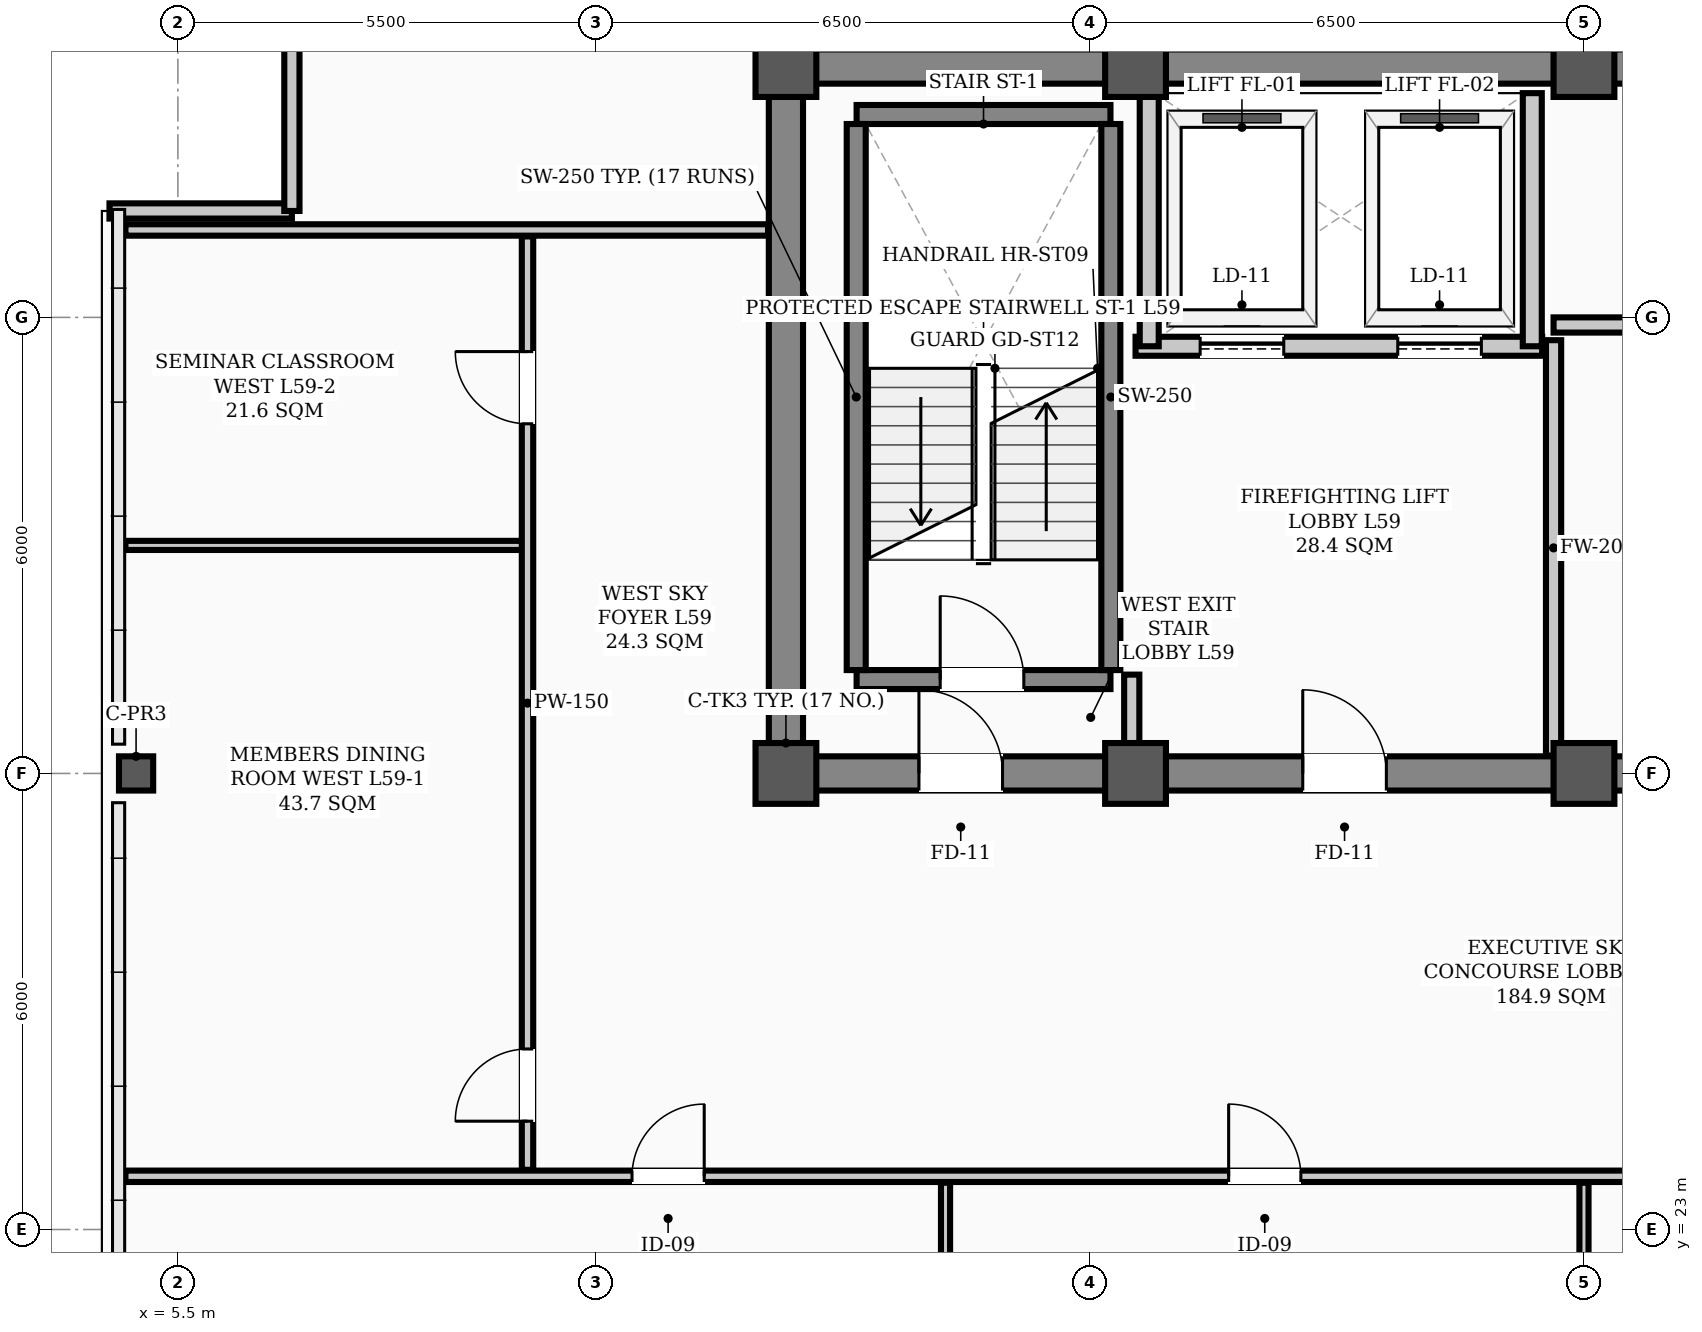
"""IFC4 building model, lengths in metres.
Left out: names, types, materials, properties, quantities, classifications, styles, units other than length and angle.
Written with IfcOpenShell. Run it as: python <this file> out.ifc"""

import sys

from ifc_helpers import new_model, si_unit, direction, frame, frame_2d, origin, origin_2d, place, context, subcontext, project, spatial, rectangle, hollow_rectangle, extrude, element, fill, save


model = new_model("IFC4")
c1 = context("Model", 3, precision=1e-05, world=origin(), true_north=direction((0.0, 1.0)))
c2 = subcontext(c1, "Body", "Model", "MODEL_VIEW")
j1 = project(units=[si_unit("LENGTHUNIT", "METRE"), si_unit("PLANEANGLEUNIT", "RADIAN")], contexts=[c1])
p1 = place(None, origin())
s1 = spatial("IfcSite", under=j1, at=p1, CompositionType="ELEMENT")
p2 = place(p1, origin())
s2 = spatial("IfcBuilding", under=s1, at=p2, CompositionType="ELEMENT")
p3 = place(p2, frame((0.0, 0.0, 238.4)))
s3 = spatial("IfcBuildingStorey", under=s2, at=p3, CompositionType="ELEMENT", Elevation=238.4)
for number, where, z_axis, x_axis in (
    (1, (13.5, 29.0, 0.0), (0.0, 0.0, 1.0), (1.0, 0.0, 0.0)),
    (2, (13.5, 38.3, 0.0), (0.0, 0.0, 1.0), (1.0, 0.0, 0.0)),
    (3, (18.1, 29.0, 0.0), (0.0, 0.0, 1.0), (1.0, 0.0, 0.0)),
    (4, (18.1, 38.3, 0.0), (0.0, 0.0, 1.0), (1.0, 0.0, 0.0)),
    (5, (24.0, 29.0, 0.0), (0.0, 0.0, 1.0), (1.0, 0.0, 0.0)),
    (6, (24.0, 38.3, 0.0), (0.0, 0.0, 1.0), (1.0, 0.0, 0.0)),
):
    element("IfcColumn", number, at=place(p3, frame(where, z_axis=z_axis, x_axis=x_axis)), inside=s3, PredefinedType="COLUMN", context=c2, shape_type="SweptSolid", body=[
        extrude(hollow_rectangle(XDim=0.8, YDim=0.8, WallThickness=0.032, InnerFilletRadius=0.016, OuterFilletRadius=0.048, at=origin_2d()), origin(), (0.0, 0.0, 1.0), 3.9),
    ])
p4 = place(p3, frame((4.95, 29.0, 0.0), z_axis=(0.0, 0.0, 1.0), x_axis=(1.0, 0.0, 0.0)))
e7 = element("IfcColumn", 7, at=p4, inside=s3, PredefinedType="COLUMN", context=c2, shape_type="SweptSolid", body=[
    extrude(hollow_rectangle(XDim=0.45, YDim=0.45, WallThickness=0.022, InnerFilletRadius=0.022, OuterFilletRadius=0.044, at=origin_2d()), origin(), (0.0, 0.0, 1.0), 3.9),
])
p5 = place(p3, frame((4.6, 36.4, 0.0), z_axis=(0.0, 0.0, 1.0), x_axis=(1.0, 0.0, 0.0)))
e8 = element("IfcWall", 8, at=p5, inside=s3, PredefinedType="PARAPET", context=c2, shape_type="SweptSolid", body=[
    extrude(rectangle(XDim=2.4, YDim=0.2, at=frame_2d((1.2, 0.0))), origin(), (0.0, 0.0, 1.0), 1.2),
])
p6 = place(p3, frame((7.0, 36.4, 0.0), z_axis=(0.0, 0.0, 1.0), x_axis=(0.0, 1.0, 0.0)))
e9 = element("IfcWall", 9, at=p6, inside=s3, PredefinedType="PARAPET", context=c2, shape_type="SweptSolid", body=[
    extrude(rectangle(XDim=2.4, YDim=0.2, at=frame_2d((1.2, 0.0))), origin(), (0.0, 0.0, 1.0), 1.2),
])
p7 = place(p3, frame((13.5, 29.0, 0.0), z_axis=(0.0, 0.0, 1.0), x_axis=(1.0, 0.0, 0.0)))
e10 = element("IfcWall", 10, at=p7, inside=s3, PredefinedType="SHEAR", context=c2, shape_type="SweptSolid", body=[
    extrude(rectangle(XDim=30.5, YDim=0.45, at=frame_2d((15.25, 0.0))), origin(), (0.0, 0.0, 1.0), 3.72),
])
p8 = place(p7, frame((1.75, 0.0, 0.0)))
e11 = element("IfcOpeningElement", 11, at=p8, cuts=e10, PredefinedType="OPENING", context=c2, shape_type="SweptSolid", body=[
    extrude(rectangle(XDim=1.1, YDim=2.08, at=frame_2d((0.55, 1.04))), frame((0.0, 0.235, 0.0), z_axis=(0.0, -1.0, 0.0), x_axis=(1.0, 0.0, 0.0)), (0.0, 0.0, 1.0), 0.47),
])
p9 = place(p7, frame((26.7, 0.0, 0.0)))
e12 = element("IfcOpeningElement", 12, at=p9, cuts=e10, PredefinedType="OPENING", context=c2, shape_type="SweptSolid", body=[
    extrude(rectangle(XDim=1.1, YDim=2.08, at=frame_2d((0.55, 1.04))), frame((0.0, 0.235, 0.0), z_axis=(0.0, -1.0, 0.0), x_axis=(1.0, 0.0, 0.0)), (0.0, 0.0, 1.0), 0.47),
])
p10 = place(p7, frame((6.8, 0.0, 0.0)))
e13 = element("IfcOpeningElement", 13, at=p10, cuts=e10, PredefinedType="OPENING", context=c2, shape_type="SweptSolid", body=[
    extrude(rectangle(XDim=1.1, YDim=2.08, at=frame_2d((0.55, 1.04))), frame((0.0, 0.235, 0.0), z_axis=(0.0, -1.0, 0.0), x_axis=(1.0, 0.0, 0.0)), (0.0, 0.0, 1.0), 0.47),
])
p11 = place(p7, frame((13.2, 0.0, 0.0)))
e14 = element("IfcOpeningElement", 14, at=p11, cuts=e10, PredefinedType="OPENING", context=c2, shape_type="SweptSolid", body=[
    extrude(rectangle(XDim=1.6, YDim=2.08, at=frame_2d((0.8, 1.04))), frame((0.0, 0.235, 0.0), z_axis=(0.0, -1.0, 0.0), x_axis=(1.0, 0.0, 0.0)), (0.0, 0.0, 1.0), 0.47),
])
p12 = place(p7, frame((19.6, 0.0, 0.0)))
e15 = element("IfcOpeningElement", 15, at=p12, cuts=e10, PredefinedType="OPENING", context=c2, shape_type="SweptSolid", body=[
    extrude(rectangle(XDim=0.9, YDim=2.08, at=frame_2d((0.45, 1.04))), frame((0.0, 0.235, 0.0), z_axis=(0.0, -1.0, 0.0), x_axis=(1.0, 0.0, 0.0)), (0.0, 0.0, 1.0), 0.47),
])
p13 = place(p7, frame((21.6, 0.0, 0.0)))
e16 = element("IfcOpeningElement", 16, at=p13, cuts=e10, PredefinedType="OPENING", context=c2, shape_type="SweptSolid", body=[
    extrude(rectangle(XDim=0.9, YDim=2.08, at=frame_2d((0.45, 1.04))), frame((0.0, 0.235, 0.0), z_axis=(0.0, -1.0, 0.0), x_axis=(1.0, 0.0, 0.0)), (0.0, 0.0, 1.0), 0.47),
])
p14 = place(p3, frame((13.5, 38.3, 0.0), z_axis=(0.0, 0.0, 1.0), x_axis=(1.0, 0.0, 0.0)))
e17 = element("IfcWall", 17, at=p14, inside=s3, PredefinedType="SHEAR", context=c2, shape_type="SweptSolid", body=[
    extrude(rectangle(XDim=30.5, YDim=0.45, at=frame_2d((15.25, 0.0))), origin(), (0.0, 0.0, 1.0), 3.72),
])
p15 = place(p3, frame((13.5, 29.35, 0.0), z_axis=(0.0, 0.0, 1.0), x_axis=(0.0, 1.0, 0.0)))
e18 = element("IfcWall", 18, at=p15, inside=s3, PredefinedType="SHEAR", context=c2, shape_type="SweptSolid", body=[
    extrude(rectangle(XDim=8.6, YDim=0.45, at=frame_2d((4.3, 0.0))), origin(), (0.0, 0.0, 1.0), 3.72),
])
p16 = place(p3, frame((14.43, 30.235, 0.0), z_axis=(0.0, 0.0, 1.0), x_axis=(1.0, 0.0, 0.0)))
e19 = element("IfcWall", 19, at=p16, inside=s3, PredefinedType="STANDARD", context=c2, shape_type="SweptSolid", body=[
    extrude(rectangle(XDim=3.34, YDim=0.25, at=frame_2d((1.67, 0.0))), origin(), (0.0, 0.0, 1.0), 3.72),
])
p17 = place(p16, frame((1.1, 0.0, 0.0)))
e20 = element("IfcOpeningElement", 20, at=p17, cuts=e19, PredefinedType="OPENING", context=c2, shape_type="SweptSolid", body=[
    extrude(rectangle(XDim=1.1, YDim=2.08, at=frame_2d((0.55, 1.04))), frame((0.0, 0.135, 0.0), z_axis=(0.0, -1.0, 0.0), x_axis=(1.0, 0.0, 0.0)), (0.0, 0.0, 1.0), 0.27),
])
p18 = place(p3, frame((14.43, 37.669, 0.0), z_axis=(0.0, 0.0, 1.0), x_axis=(1.0, 0.0, 0.0)))
e21 = element("IfcWall", 21, at=p18, inside=s3, PredefinedType="STANDARD", context=c2, shape_type="SweptSolid", body=[
    extrude(rectangle(XDim=3.34, YDim=0.25, at=frame_2d((1.67, 0.0))), origin(), (0.0, 0.0, 1.0), 3.72),
])
for number, where, z_axis, x_axis in (
    (22, (14.425, 30.36, 0.0), (0.0, 0.0, 1.0), (0.0, 1.0, 0.0)),
    (23, (17.775, 30.36, 0.0), (0.0, 0.0, 1.0), (0.0, 1.0, 0.0)),
):
    element("IfcWall", number, at=place(p3, frame(where, z_axis=z_axis, x_axis=x_axis)), inside=s3, PredefinedType="STANDARD", context=c2, shape_type="SweptSolid", body=[
        extrude(rectangle(XDim=7.184, YDim=0.25, at=frame_2d((3.592, 0.0))), origin(), (0.0, 0.0, 1.0), 3.72),
    ])
p19 = place(p3, frame((18.1, 34.62, 0.0), z_axis=(0.0, 0.0, 1.0), x_axis=(1.0, 0.0, 0.0)))
e24 = element("IfcWall", 24, at=p19, inside=s3, PredefinedType="STANDARD", context=c2, shape_type="SweptSolid", body=[
    extrude(rectangle(XDim=5.35, YDim=0.25, at=frame_2d((2.675, 0.0))), origin(), (0.0, 0.0, 1.0), 3.72),
])
p20 = place(p19, frame((0.85, 0.0, 0.0)))
e25 = element("IfcOpeningElement", 25, at=p20, cuts=e24, PredefinedType="OPENING", context=c2, shape_type="SweptSolid", body=[
    extrude(rectangle(XDim=1.1, YDim=2.08, at=frame_2d((0.55, 1.04))), frame((0.0, 0.135, 0.0), z_axis=(0.0, -1.0, 0.0), x_axis=(1.0, 0.0, 0.0)), (0.0, 0.0, 1.0), 0.27),
])
p21 = place(p19, frame((3.45, 0.0, 0.0)))
e26 = element("IfcOpeningElement", 26, at=p21, cuts=e24, PredefinedType="OPENING", context=c2, shape_type="SweptSolid", body=[
    extrude(rectangle(XDim=1.1, YDim=2.08, at=frame_2d((0.55, 1.04))), frame((0.0, 0.135, 0.0), z_axis=(0.0, -1.0, 0.0), x_axis=(1.0, 0.0, 0.0)), (0.0, 0.0, 1.0), 0.27),
])
for number, where, z_axis, x_axis in (
    (27, (18.28, 34.62, 0.0), (0.0, 0.0, 1.0), (0.0, 1.0, 0.0)),
    (28, (23.32, 34.62, 0.0), (0.0, 0.0, 1.0), (0.0, 1.0, 0.0)),
):
    element("IfcWall", number, at=place(p3, frame(where, z_axis=z_axis, x_axis=x_axis)), inside=s3, PredefinedType="STANDARD", context=c2, shape_type="SweptSolid", body=[
        extrude(rectangle(XDim=3.33, YDim=0.25, at=frame_2d((1.665, 0.0))), origin(), (0.0, 0.0, 1.0), 3.72),
    ])
p22 = place(p3, frame((23.6, 34.9, 0.0), z_axis=(0.0, 0.0, 1.0), x_axis=(1.0, 0.0, 0.0)))
e29 = element("IfcWall", 29, at=p22, inside=s3, PredefinedType="STANDARD", context=c2, shape_type="SweptSolid", body=[
    extrude(rectangle(XDim=8.18, YDim=0.2, at=frame_2d((4.09, 0.0))), origin(), (0.0, 0.0, 1.0), 3.72),
])
p23 = place(p22, frame((3.45, 0.0, 0.0)))
e30 = element("IfcOpeningElement", 30, at=p23, cuts=e29, PredefinedType="OPENING", context=c2, shape_type="SweptSolid", body=[
    extrude(rectangle(XDim=1.1, YDim=2.08, at=frame_2d((0.55, 1.04))), frame((0.0, 0.11, 0.0), z_axis=(0.0, -1.0, 0.0), x_axis=(1.0, 0.0, 0.0)), (0.0, 0.0, 1.0), 0.22),
])
p24 = place(p3, frame((4.81, 23.7, 0.0), z_axis=(0.0, 0.0, 1.0), x_axis=(1.0, 0.0, 0.0)))
e31 = element("IfcWall", 31, at=p24, inside=s3, PredefinedType="PARTITIONING", context=c2, shape_type="SweptSolid", body=[
    extrude(rectangle(XDim=40.88, YDim=0.15, at=frame_2d((20.44, 0.0))), origin(), (0.0, 0.0, 1.0), 3.2),
])
p25 = place(p24, frame((6.665, 0.0, 0.0)))
e32 = element("IfcOpeningElement", 32, at=p25, cuts=e31, PredefinedType="OPENING", context=c2, shape_type="SweptSolid", body=[
    extrude(rectangle(XDim=0.95, YDim=2.08, at=frame_2d((0.475, 1.04))), frame((0.0, 0.085, 0.0), z_axis=(0.0, -1.0, 0.0), x_axis=(1.0, 0.0, 0.0)), (0.0, 0.0, 1.0), 0.17),
])
p26 = place(p24, frame((14.515, 0.0, 0.0)))
e33 = element("IfcOpeningElement", 33, at=p26, cuts=e31, PredefinedType="OPENING", context=c2, shape_type="SweptSolid", body=[
    extrude(rectangle(XDim=0.95, YDim=2.08, at=frame_2d((0.475, 1.04))), frame((0.0, 0.085, 0.0), z_axis=(0.0, -1.0, 0.0), x_axis=(1.0, 0.0, 0.0)), (0.0, 0.0, 1.0), 0.17),
])
p27 = place(p24, frame((23.115, 0.0, 0.0)))
e34 = element("IfcOpeningElement", 34, at=p27, cuts=e31, PredefinedType="OPENING", context=c2, shape_type="SweptSolid", body=[
    extrude(rectangle(XDim=0.95, YDim=2.08, at=frame_2d((0.475, 1.04))), frame((0.0, 0.085, 0.0), z_axis=(0.0, -1.0, 0.0), x_axis=(1.0, 0.0, 0.0)), (0.0, 0.0, 1.0), 0.17),
])
p28 = place(p24, frame((28.565, 0.0, 0.0)))
e35 = element("IfcOpeningElement", 35, at=p28, cuts=e31, PredefinedType="OPENING", context=c2, shape_type="SweptSolid", body=[
    extrude(rectangle(XDim=0.95, YDim=2.08, at=frame_2d((0.475, 1.04))), frame((0.0, 0.085, 0.0), z_axis=(0.0, -1.0, 0.0), x_axis=(1.0, 0.0, 0.0)), (0.0, 0.0, 1.0), 0.17),
])
p29 = place(p24, frame((36.965, 0.0, 0.0)))
e36 = element("IfcOpeningElement", 36, at=p29, cuts=e31, PredefinedType="OPENING", context=c2, shape_type="SweptSolid", body=[
    extrude(rectangle(XDim=0.95, YDim=2.08, at=frame_2d((0.475, 1.04))), frame((0.0, 0.085, 0.0), z_axis=(0.0, -1.0, 0.0), x_axis=(1.0, 0.0, 0.0)), (0.0, 0.0, 1.0), 0.17),
])
p30 = place(p3, frame((4.81, 36.15, 0.0), z_axis=(0.0, 0.0, 1.0), x_axis=(1.0, 0.0, 0.0)))
e37 = element("IfcWall", 37, at=p30, inside=s3, PredefinedType="PARTITIONING", context=c2, shape_type="SweptSolid", body=[
    extrude(rectangle(XDim=8.455, YDim=0.15, at=frame_2d((4.228, 0.0))), origin(), (0.0, 0.0, 1.0), 3.2),
])
p31 = place(p3, frame((4.81, 32.0, 0.0), z_axis=(0.0, 0.0, 1.0), x_axis=(1.0, 0.0, 0.0)))
e38 = element("IfcWall", 38, at=p31, inside=s3, PredefinedType="PARTITIONING", context=c2, shape_type="SweptSolid", body=[
    extrude(rectangle(XDim=5.29, YDim=0.12, at=frame_2d((2.645, 0.0))), origin(), (0.0, 0.0, 1.0), 3.72),
])
p32 = place(p3, frame((18.05, 29.235, 0.0), z_axis=(0.0, 0.0, 1.0), x_axis=(0.0, 1.0, 0.0)))
e39 = element("IfcWall", 39, at=p32, inside=s3, PredefinedType="STANDARD", context=c2, shape_type="SweptSolid", body=[
    extrude(rectangle(XDim=1.065, YDim=0.2, at=frame_2d((0.532, 0.0))), origin(), (0.0, 0.0, 1.0), 3.35),
])
p33 = place(p3, frame((23.6, 29.235, 0.0), z_axis=(0.0, 0.0, 1.0), x_axis=(0.0, 1.0, 0.0)))
e40 = element("IfcWall", 40, at=p33, inside=s3, PredefinedType="STANDARD", context=c2, shape_type="SweptSolid", body=[
    extrude(rectangle(XDim=5.465, YDim=0.2, at=frame_2d((2.732, 0.0))), origin(), (0.0, 0.0, 1.0), 3.2),
])
p34 = place(p3, frame((10.1, 23.785, 0.0), z_axis=(0.0, 0.0, 1.0), x_axis=(0.0, 1.0, 0.0)))
e41 = element("IfcWall", 41, at=p34, inside=s3, PredefinedType="PARTITIONING", context=c2, shape_type="SweptSolid", body=[
    extrude(rectangle(XDim=12.28, YDim=0.15, at=frame_2d((6.14, 0.0))), origin(), (0.0, 0.0, 1.0), 3.1),
])
p35 = place(p34, frame((0.64, 0.0, 0.0)))
e42 = element("IfcOpeningElement", 42, at=p35, cuts=e41, PredefinedType="OPENING", context=c2, shape_type="SweptSolid", body=[
    extrude(rectangle(XDim=0.95, YDim=2.08, at=frame_2d((0.475, 1.04))), frame((0.0, 0.085, 0.0), z_axis=(0.0, -1.0, 0.0), x_axis=(1.0, 0.0, 0.0)), (0.0, 0.0, 1.0), 0.17),
])
p36 = place(p34, frame((9.815, 0.0, 0.0)))
e43 = element("IfcOpeningElement", 43, at=p36, cuts=e41, PredefinedType="OPENING", context=c2, shape_type="SweptSolid", body=[
    extrude(rectangle(XDim=0.95, YDim=2.08, at=frame_2d((0.475, 1.04))), frame((0.0, 0.085, 0.0), z_axis=(0.0, -1.0, 0.0), x_axis=(1.0, 0.0, 0.0)), (0.0, 0.0, 1.0), 0.17),
])
p37 = place(p3, frame((15.6, 12.41, 0.0), z_axis=(0.0, 0.0, 1.0), x_axis=(0.0, 1.0, 0.0)))
e44 = element("IfcWall", 44, at=p37, inside=s3, PredefinedType="PARTITIONING", context=c2, shape_type="SweptSolid", body=[
    extrude(rectangle(XDim=11.205, YDim=0.12, at=frame_2d((5.603, 0.0))), origin(), (0.0, 0.0, 1.0), 3.1),
])
p38 = place(p3, frame((24.0, 14.17, 0.0), z_axis=(0.0, 0.0, 1.0), x_axis=(0.0, 1.0, 0.0)))
e45 = element("IfcWall", 45, at=p38, inside=s3, PredefinedType="PARTITIONING", context=c2, shape_type="SweptSolid", body=[
    extrude(rectangle(XDim=9.445, YDim=0.12, at=frame_2d((4.723, 0.0))), origin(), (0.0, 0.0, 1.0), 3.1),
])
p39 = place(p17, origin())
e46 = element("IfcDoor", 46, at=p39, inside=s3, OperationType="SINGLE_SWING_LEFT", PredefinedType="DOOR", context=c2, shape_type="SweptSolid", body=[
    extrude(rectangle(XDim=1.1, YDim=2.08, at=frame_2d((0.55, 1.04))), frame((0.0, 0.025, 0.0), z_axis=(0.0, -1.0, 0.0), x_axis=(1.0, 0.0, 0.0)), (0.0, 0.0, 1.0), 0.05),
])
fill(e20, e46)
p40 = place(p8, origin())
e47 = element("IfcDoor", 47, at=p40, inside=s3, OperationType="SINGLE_SWING_LEFT", PredefinedType="DOOR", context=c2, shape_type="SweptSolid", body=[
    extrude(rectangle(XDim=1.1, YDim=2.08, at=frame_2d((0.55, 1.04))), frame((0.0, 0.025, 0.0), z_axis=(0.0, -1.0, 0.0), x_axis=(1.0, 0.0, 0.0)), (0.0, 0.0, 1.0), 0.05),
])
fill(e11, e47)
p41 = place(p10, origin())
e48 = element("IfcDoor", 48, at=p41, inside=s3, OperationType="SINGLE_SWING_LEFT", PredefinedType="DOOR", context=c2, shape_type="SweptSolid", body=[
    extrude(rectangle(XDim=1.1, YDim=2.08, at=frame_2d((0.55, 1.04))), frame((0.0, 0.025, 0.0), z_axis=(0.0, -1.0, 0.0), x_axis=(1.0, 0.0, 0.0)), (0.0, 0.0, 1.0), 0.05),
])
fill(e13, e48)
p42 = place(p25, origin())
e49 = element("IfcDoor", 49, at=p42, inside=s3, OperationType="SINGLE_SWING_RIGHT", PredefinedType="DOOR", context=c2, shape_type="SweptSolid", body=[
    extrude(rectangle(XDim=0.95, YDim=2.08, at=frame_2d((0.475, 1.04))), frame((0.0, 0.025, 0.0), z_axis=(0.0, -1.0, 0.0), x_axis=(1.0, 0.0, 0.0)), (0.0, 0.0, 1.0), 0.05),
])
fill(e32, e49)
p43 = place(p26, origin())
e50 = element("IfcDoor", 50, at=p43, inside=s3, OperationType="SINGLE_SWING_LEFT", PredefinedType="DOOR", context=c2, shape_type="SweptSolid", body=[
    extrude(rectangle(XDim=0.95, YDim=2.08, at=frame_2d((0.475, 1.04))), frame((0.0, 0.025, 0.0), z_axis=(0.0, -1.0, 0.0), x_axis=(1.0, 0.0, 0.0)), (0.0, 0.0, 1.0), 0.05),
])
fill(e33, e50)
p44 = place(p35, origin())
e51 = element("IfcDoor", 51, at=p44, inside=s3, OperationType="SINGLE_SWING_LEFT", PredefinedType="DOOR", context=c2, shape_type="SweptSolid", body=[
    extrude(rectangle(XDim=0.95, YDim=2.08, at=frame_2d((0.475, 1.04))), frame((0.0, 0.025, 0.0), z_axis=(0.0, -1.0, 0.0), x_axis=(1.0, 0.0, 0.0)), (0.0, 0.0, 1.0), 0.05),
])
fill(e42, e51)
p45 = place(p36, origin())
e52 = element("IfcDoor", 52, at=p45, inside=s3, OperationType="SINGLE_SWING_RIGHT", PredefinedType="DOOR", context=c2, shape_type="SweptSolid", body=[
    extrude(rectangle(XDim=0.95, YDim=2.08, at=frame_2d((0.475, 1.04))), frame((0.0, 0.025, 0.0), z_axis=(0.0, -1.0, 0.0), x_axis=(1.0, 0.0, 0.0)), (0.0, 0.0, 1.0), 0.05),
])
fill(e43, e52)
p46 = place(p20, origin())
e53 = element("IfcDoor", 53, at=p46, inside=s3, OperationType="SLIDING_TO_LEFT", PredefinedType="DOOR", context=c2, shape_type="SweptSolid", body=[
    extrude(rectangle(XDim=1.1, YDim=2.08, at=frame_2d((0.55, 1.04))), frame((0.0, 0.025, 0.0), z_axis=(0.0, -1.0, 0.0), x_axis=(1.0, 0.0, 0.0)), (0.0, 0.0, 1.0), 0.05),
])
fill(e25, e53)
p47 = place(p21, origin())
e54 = element("IfcDoor", 54, at=p47, inside=s3, OperationType="SLIDING_TO_LEFT", PredefinedType="DOOR", context=c2, shape_type="SweptSolid", body=[
    extrude(rectangle(XDim=1.1, YDim=2.08, at=frame_2d((0.55, 1.04))), frame((0.0, 0.025, 0.0), z_axis=(0.0, -1.0, 0.0), x_axis=(1.0, 0.0, 0.0)), (0.0, 0.0, 1.0), 0.05),
])
fill(e26, e54)
save(model, sys.argv[1])
